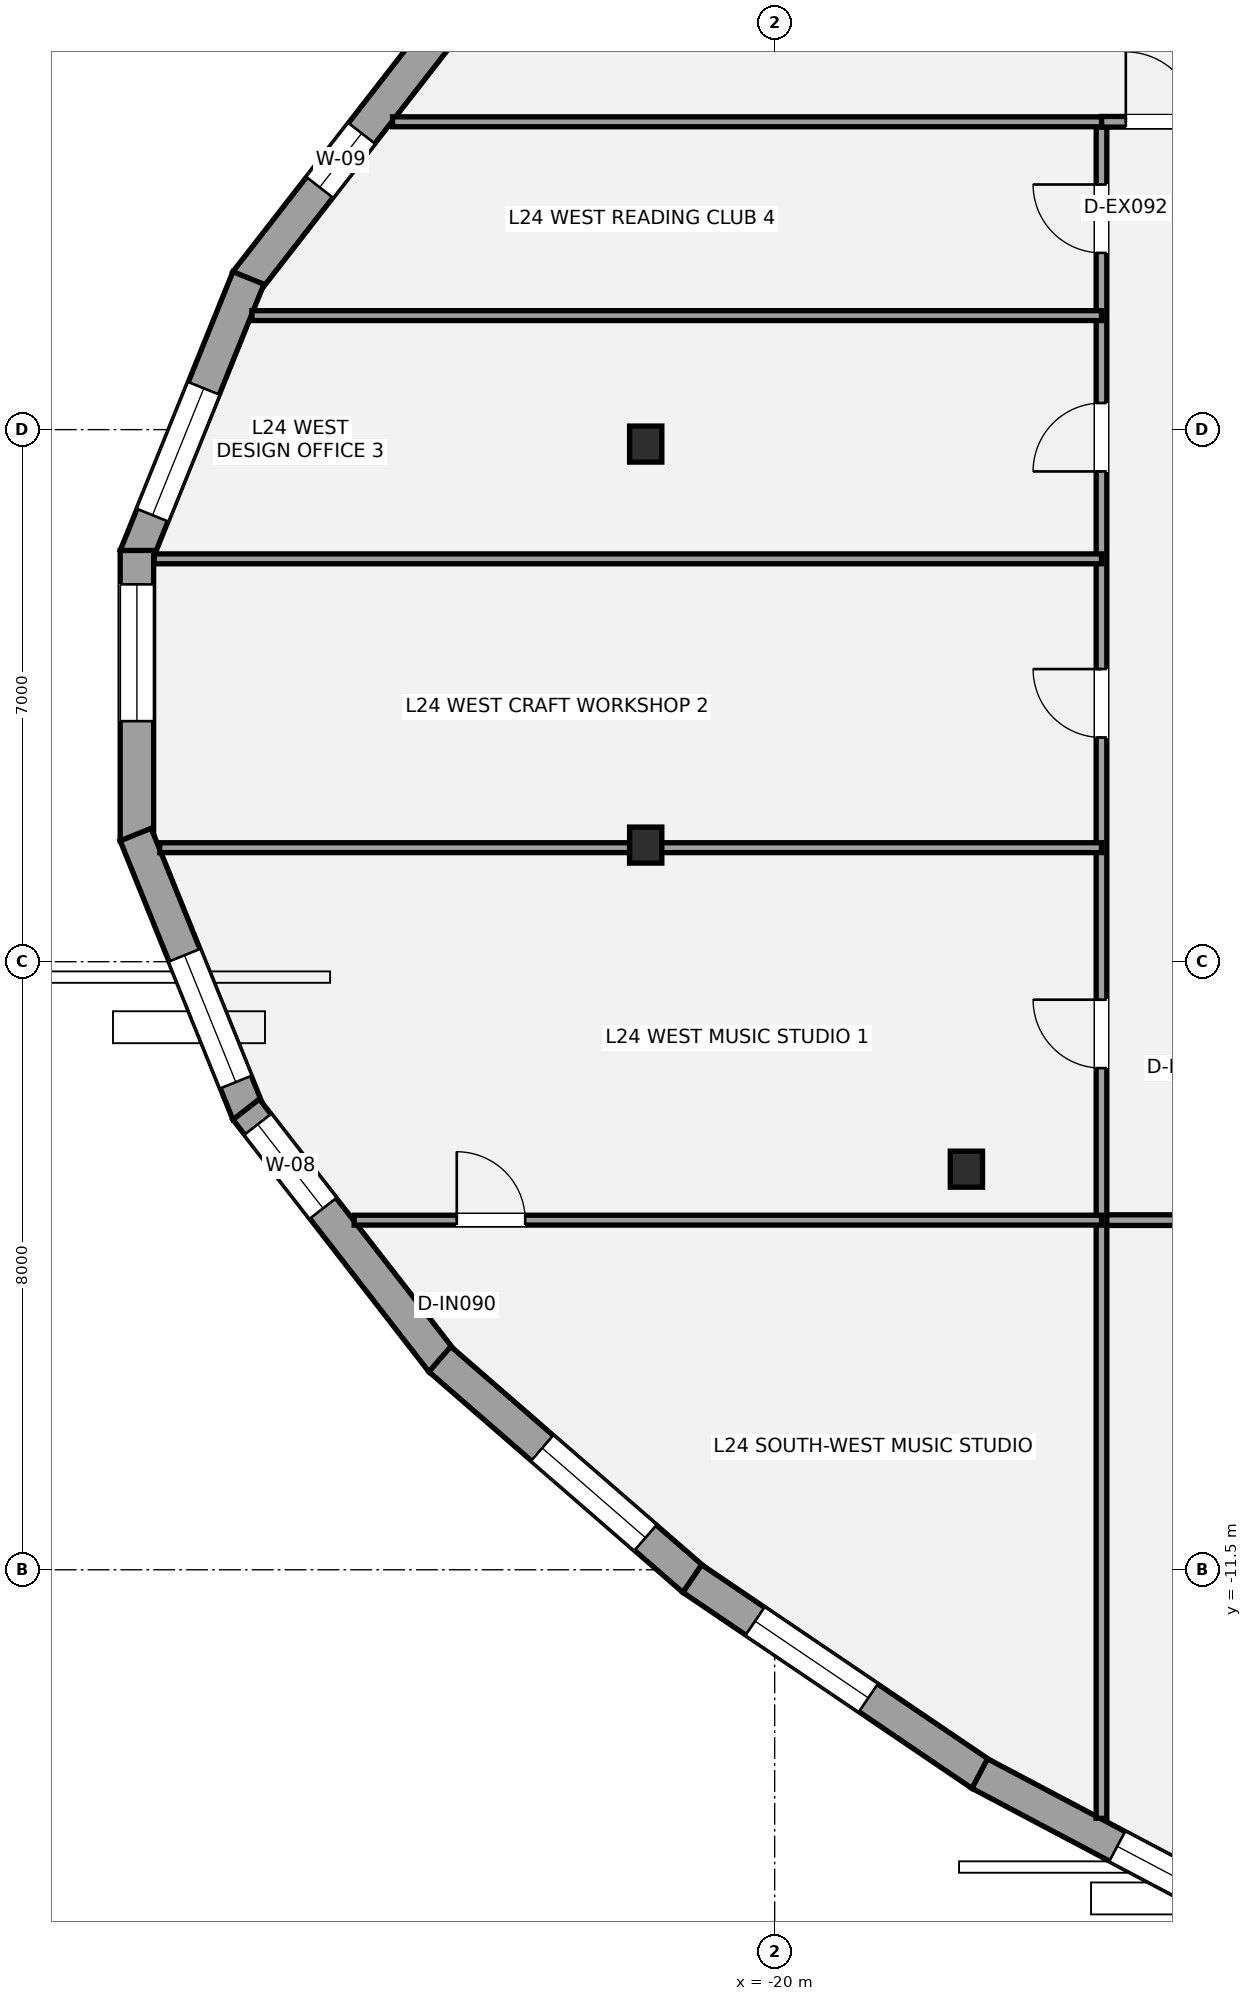
"""IFC4 building model, lengths in metres.
Left out: names, types, materials, properties, quantities, classifications, styles, units other than length and angle.
Written with IfcOpenShell. Run it as: python <this file> out.ifc"""

import sys

from ifc_helpers import new_model, si_unit, direction, frame, frame_2d, origin, origin_2d, place, context, subcontext, project, spatial, rectangle, i_section, extrude, element, fill, save


model = new_model("IFC4")
c1 = context("Model", 3, precision=1e-05, world=origin(), true_north=direction((0.0, 1.0)))
c2 = subcontext(c1, "Body", "Model", "MODEL_VIEW")
j1 = project(units=[si_unit("LENGTHUNIT", "METRE"), si_unit("PLANEANGLEUNIT", "RADIAN")], contexts=[c1])
p1 = place(None, origin())
s1 = spatial("IfcSite", under=j1, at=p1, CompositionType="ELEMENT")
p2 = place(p1, origin())
s2 = spatial("IfcBuilding", under=s1, at=p2, CompositionType="ELEMENT")
p3 = place(p2, frame((0.0, 0.0, 93.1)))
s3 = spatial("IfcBuildingStorey", under=s2, at=p3, CompositionType="ELEMENT", Elevation=93.1)
for number, where, z_axis, x_axis in (
    (1, (-21.697, 3.31, 0.0), (0.0, 0.0, 1.0), (1.0, 0.0, 0.0)),
    (2, (-21.697, -1.966, 0.0), (0.0, 0.0, 1.0), (1.0, 0.0, 0.0)),
    (3, (-17.477, -6.229, 0.0), (0.0, 0.0, 1.0), (1.0, 0.0, 0.0)),
):
    element("IfcColumn", number, at=place(p3, frame(where, z_axis=z_axis, x_axis=x_axis)), inside=s3, PredefinedType="COLUMN", context=c2, shape_type="SweptSolid", body=[
        extrude(i_section(OverallWidth=0.424, OverallDepth=0.474, WebThickness=0.048, FlangeThickness=0.077, at=origin_2d()), origin(), (0.0, 0.0, 1.0), 3.5),
    ])
p4 = place(p3, frame((-26.954, 5.443, 0.0), z_axis=(0.0, 0.0, 1.0), x_axis=(0.61375552181, 0.789496142769, 0.0)))
e4 = element("IfcWall", 4, at=p4, inside=s3, PredefinedType="STANDARD", context=c2, shape_type="SweptSolid", body=[
    extrude(rectangle(XDim=4.201, YDim=0.44, at=frame_2d((2.101, 0.0))), origin(), (0.0, 0.0, 1.0), 2.528),
])
p5 = place(p4, frame((1.577, 0.0, 0.58)))
e5 = element("IfcOpeningElement", 5, at=p5, cuts=e4, PredefinedType="OPENING", context=c2, shape_type="SweptSolid", body=[
    extrude(rectangle(XDim=0.9, YDim=1.35, at=frame_2d((0.45, 0.675))), frame((0.0, 0.23, 0.0), z_axis=(0.0, -1.0, 0.0), x_axis=(1.0, 0.0, 0.0)), (0.0, 0.0, 1.0), 0.46),
])
p6 = place(p3, frame((-28.407, 1.828, 0.0), z_axis=(0.0, 0.0, 1.0), x_axis=(0.374920072969, 0.927057138954, 0.0)))
e6 = element("IfcWall", 6, at=p6, inside=s3, PredefinedType="STANDARD", context=c2, shape_type="SweptSolid", body=[
    extrude(rectangle(XDim=3.957, YDim=0.44, at=frame_2d((1.978, 0.0))), origin(), (0.0, 0.0, 1.0), 2.528),
])
p7 = place(p6, frame((0.59, 0.0, 0.65)))
e7 = element("IfcOpeningElement", 7, at=p7, cuts=e6, PredefinedType="OPENING", context=c2, shape_type="SweptSolid", body=[
    extrude(rectangle(XDim=1.8, YDim=1.7, at=frame_2d((0.9, 0.85))), frame((0.0, 0.23, 0.0), z_axis=(0.0, -1.0, 0.0), x_axis=(1.0, 0.0, 0.0)), (0.0, 0.0, 1.0), 0.46),
])
p8 = place(p3, frame((-28.391, -1.91, 0.0), z_axis=(0.0, 0.0, 1.0), x_axis=(0.0, 1.0, 0.0)))
e8 = element("IfcWall", 8, at=p8, inside=s3, PredefinedType="STANDARD", context=c2, shape_type="SweptSolid", body=[
    extrude(rectangle(XDim=3.82, YDim=0.44, at=frame_2d((1.91, 0.0))), origin(), (0.0, 0.0, 1.0), 2.528),
])
p9 = place(p8, frame((1.575, 0.0, 0.65)))
e9 = element("IfcOpeningElement", 9, at=p9, cuts=e8, PredefinedType="OPENING", context=c2, shape_type="SweptSolid", body=[
    extrude(rectangle(XDim=1.8, YDim=1.7, at=frame_2d((0.9, 0.85))), frame((0.0, 0.23, 0.0), z_axis=(0.0, -1.0, 0.0), x_axis=(1.0, 0.0, 0.0)), (0.0, 0.0, 1.0), 0.46),
])
p10 = place(p3, frame((-26.924, -5.496, 0.0), z_axis=(0.0, 0.0, 1.0), x_axis=(-0.374920072969, 0.927057138954, 0.0)))
e10 = element("IfcWall", 10, at=p10, inside=s3, PredefinedType="STANDARD", context=c2, shape_type="SweptSolid", body=[
    extrude(rectangle(XDim=3.957, YDim=0.44, at=frame_2d((1.978, 0.0))), origin(), (0.0, 0.0, 1.0), 2.528),
])
p11 = place(p10, frame((0.444, 0.0, 0.65)))
e11 = element("IfcOpeningElement", 11, at=p11, cuts=e10, PredefinedType="OPENING", context=c2, shape_type="SweptSolid", body=[
    extrude(rectangle(XDim=1.8, YDim=1.7, at=frame_2d((0.9, 0.85))), frame((0.0, 0.23, 0.0), z_axis=(0.0, -1.0, 0.0), x_axis=(1.0, 0.0, 0.0)), (0.0, 0.0, 1.0), 0.46),
])
p12 = place(p3, frame((-24.376, -8.76, 0.0), z_axis=(0.0, 0.0, 1.0), x_axis=(-0.61375552181, 0.789496142769, 0.0)))
e12 = element("IfcWall", 12, at=p12, inside=s3, PredefinedType="STANDARD", context=c2, shape_type="SweptSolid", body=[
    extrude(rectangle(XDim=4.201, YDim=0.44, at=frame_2d((2.101, 0.0))), origin(), (0.0, 0.0, 1.0), 2.528),
])
p13 = place(p12, frame((2.552, 0.0, 0.58)))
e13 = element("IfcOpeningElement", 13, at=p13, cuts=e12, PredefinedType="OPENING", context=c2, shape_type="SweptSolid", body=[
    extrude(rectangle(XDim=1.4, YDim=1.55, at=frame_2d((0.7, 0.775))), frame((0.0, 0.23, 0.0), z_axis=(0.0, -1.0, 0.0), x_axis=(1.0, 0.0, 0.0)), (0.0, 0.0, 1.0), 0.46),
])
p14 = place(p3, frame((-21.063, -11.632, 0.0), z_axis=(0.0, 0.0, 1.0), x_axis=(-0.754922454992, 0.655814064312, 0.0)))
e14 = element("IfcWall", 14, at=p14, inside=s3, PredefinedType="STANDARD", context=c2, shape_type="SweptSolid", body=[
    extrude(rectangle(XDim=4.427, YDim=0.44, at=frame_2d((2.213, 0.0))), origin(), (0.0, 0.0, 1.0), 2.528),
])
p15 = place(p14, frame((0.843, 0.0, 0.65)))
e15 = element("IfcOpeningElement", 15, at=p15, cuts=e14, PredefinedType="OPENING", context=c2, shape_type="SweptSolid", body=[
    extrude(rectangle(XDim=1.8, YDim=1.7, at=frame_2d((0.9, 0.85))), frame((0.0, 0.23, 0.0), z_axis=(0.0, -1.0, 0.0), x_axis=(1.0, 0.0, 0.0)), (0.0, 0.0, 1.0), 0.46),
])
p16 = place(p3, frame((-17.281, -14.193, 0.0), z_axis=(0.0, 0.0, 1.0), x_axis=(-0.827749911298, 0.561097214701, 0.0)))
e16 = element("IfcWall", 16, at=p16, inside=s3, PredefinedType="STANDARD", context=c2, shape_type="SweptSolid", body=[
    extrude(rectangle(XDim=4.594, YDim=0.44, at=frame_2d((2.297, 0.0))), origin(), (0.0, 0.0, 1.0), 2.528),
])
p17 = place(p16, frame((1.796, 0.0, 0.65)))
e17 = element("IfcOpeningElement", 17, at=p17, cuts=e16, PredefinedType="OPENING", context=c2, shape_type="SweptSolid", body=[
    extrude(rectangle(XDim=1.8, YDim=1.7, at=frame_2d((0.9, 0.85))), frame((0.0, 0.23, 0.0), z_axis=(0.0, -1.0, 0.0), x_axis=(1.0, 0.0, 0.0)), (0.0, 0.0, 1.0), 0.46),
])
p18 = place(p3, frame((-13.019, -16.446, 0.0), z_axis=(0.0, 0.0, 1.0), x_axis=(-0.88395333318, 0.467575132743, 0.0)))
e18 = element("IfcWall", 18, at=p18, inside=s3, PredefinedType="STANDARD", context=c2, shape_type="SweptSolid", body=[
    extrude(rectangle(XDim=4.845, YDim=0.44, at=frame_2d((2.422, 0.0))), origin(), (0.0, 0.0, 1.0), 2.528),
])
p19 = place(p18, frame((0.998, 0.0, 0.65)))
e19 = element("IfcOpeningElement", 19, at=p19, cuts=e18, PredefinedType="OPENING", context=c2, shape_type="SweptSolid", body=[
    extrude(rectangle(XDim=1.8, YDim=1.7, at=frame_2d((0.9, 0.85))), frame((0.0, 0.23, 0.0), z_axis=(0.0, -1.0, 0.0), x_axis=(1.0, 0.0, 0.0)), (0.0, 0.0, 1.0), 0.46),
])
p20 = place(p3, frame((-15.7, -6.9, 0.0), z_axis=(0.0, 0.0, 1.0), x_axis=(1.0, 0.0, 0.0)))
e20 = element("IfcWall", 20, at=p20, inside=s3, PredefinedType="PARTITIONING", context=c2, shape_type="SweptSolid", body=[
    extrude(rectangle(XDim=33.2, YDim=0.14, at=frame_2d((16.6, 0.0))), origin(), (0.0, 0.0, 1.0), 2.688),
])
p21 = place(p20, frame((3.15, 0.0, 0.0)))
e21 = element("IfcOpeningElement", 21, at=p21, cuts=e20, PredefinedType="OPENING", context=c2, shape_type="SweptSolid", body=[
    extrude(rectangle(XDim=0.9, YDim=2.1, at=frame_2d((0.45, 1.05))), frame((0.0, 0.08, 0.0), z_axis=(0.0, -1.0, 0.0), x_axis=(1.0, 0.0, 0.0)), (0.0, 0.0, 1.0), 0.16),
])
p22 = place(p20, frame((11.0, 0.0, 0.0)))
e22 = element("IfcOpeningElement", 22, at=p22, cuts=e20, PredefinedType="OPENING", context=c2, shape_type="SweptSolid", body=[
    extrude(rectangle(XDim=0.9, YDim=2.1, at=frame_2d((0.45, 1.05))), frame((0.0, 0.08, 0.0), z_axis=(0.0, -1.0, 0.0), x_axis=(1.0, 0.0, 0.0)), (0.0, 0.0, 1.0), 0.16),
])
p23 = place(p20, frame((19.5, 0.0, 0.0)))
e23 = element("IfcOpeningElement", 23, at=p23, cuts=e20, PredefinedType="OPENING", context=c2, shape_type="SweptSolid", body=[
    extrude(rectangle(XDim=0.9, YDim=2.1, at=frame_2d((0.45, 1.05))), frame((0.0, 0.08, 0.0), z_axis=(0.0, -1.0, 0.0), x_axis=(1.0, 0.0, 0.0)), (0.0, 0.0, 1.0), 0.16),
])
p24 = place(p20, frame((27.95, 0.0, 0.0)))
e24 = element("IfcOpeningElement", 24, at=p24, cuts=e20, PredefinedType="OPENING", context=c2, shape_type="SweptSolid", body=[
    extrude(rectangle(XDim=1.5, YDim=2.15, at=frame_2d((0.75, 1.075))), frame((0.0, 0.08, 0.0), z_axis=(0.0, -1.0, 0.0), x_axis=(1.0, 0.0, 0.0)), (0.0, 0.0, 1.0), 0.16),
])
p25 = place(p3, frame((-15.7, -14.77, 0.0), z_axis=(0.0, 0.0, 1.0), x_axis=(0.0, 1.0, 0.0)))
e25 = element("IfcWall", 25, at=p25, inside=s3, PredefinedType="PARTITIONING", context=c2, shape_type="SweptSolid", body=[
    extrude(rectangle(XDim=22.32, YDim=0.14, at=frame_2d((11.16, 0.0))), origin(), (0.0, 0.0, 1.0), 2.751),
])
p26 = place(p25, frame((9.87, 0.0, 0.0)))
e26 = element("IfcOpeningElement", 26, at=p26, cuts=e25, PredefinedType="OPENING", context=c2, shape_type="SweptSolid", body=[
    extrude(rectangle(XDim=0.9, YDim=2.1, at=frame_2d((0.45, 1.05))), frame((0.0, 0.08, 0.0), z_axis=(0.0, -1.0, 0.0), x_axis=(1.0, 0.0, 0.0)), (0.0, 0.0, 1.0), 0.16),
])
p27 = place(p25, frame((14.22, 0.0, 0.0)))
e27 = element("IfcOpeningElement", 27, at=p27, cuts=e25, PredefinedType="OPENING", context=c2, shape_type="SweptSolid", body=[
    extrude(rectangle(XDim=0.9, YDim=2.1, at=frame_2d((0.45, 1.05))), frame((0.0, 0.08, 0.0), z_axis=(0.0, -1.0, 0.0), x_axis=(1.0, 0.0, 0.0)), (0.0, 0.0, 1.0), 0.16),
])
p28 = place(p25, frame((17.72, 0.0, 0.0)))
e28 = element("IfcOpeningElement", 28, at=p28, cuts=e25, PredefinedType="OPENING", context=c2, shape_type="SweptSolid", body=[
    extrude(rectangle(XDim=0.9, YDim=2.1, at=frame_2d((0.45, 1.05))), frame((0.0, 0.08, 0.0), z_axis=(0.0, -1.0, 0.0), x_axis=(1.0, 0.0, 0.0)), (0.0, 0.0, 1.0), 0.16),
])
p29 = place(p25, frame((20.595, 0.0, 0.0)))
e29 = element("IfcOpeningElement", 29, at=p29, cuts=e25, PredefinedType="OPENING", context=c2, shape_type="SweptSolid", body=[
    extrude(rectangle(XDim=0.9, YDim=2.1, at=frame_2d((0.45, 1.05))), frame((0.0, 0.08, 0.0), z_axis=(0.0, -1.0, 0.0), x_axis=(1.0, 0.0, 0.0)), (0.0, 0.0, 1.0), 0.16),
])
p30 = place(p3, frame((-15.7, 7.55, 0.0), z_axis=(0.0, 0.0, 1.0), x_axis=(1.0, 0.0, 0.0)))
e30 = element("IfcWall", 30, at=p30, inside=s3, PredefinedType="PARTITIONING", context=c2, shape_type="SweptSolid", body=[
    extrude(rectangle(XDim=1.8, YDim=0.14, at=frame_2d((0.9, 0.0))), origin(), (0.0, 0.0, 1.0), 2.763),
])
p31 = place(p30, frame((0.32, 0.0, 0.0)))
e31 = element("IfcOpeningElement", 31, at=p31, cuts=e30, PredefinedType="OPENING", context=c2, shape_type="SweptSolid", body=[
    extrude(rectangle(XDim=0.92, YDim=2.15, at=frame_2d((0.46, 1.075))), frame((0.0, 0.08, 0.0), z_axis=(0.0, -1.0, 0.0), x_axis=(1.0, 0.0, 0.0)), (0.0, 0.0, 1.0), 0.16),
])
p32 = place(p3, frame((-25.027, 7.55, 0.0), z_axis=(0.0, 0.0, 1.0), x_axis=(1.0, 0.0, 0.0)))
e32 = element("IfcWall", 32, at=p32, inside=s3, PredefinedType="PARTITIONING", context=c2, shape_type="SweptSolid", body=[
    extrude(rectangle(XDim=9.327, YDim=0.13, at=frame_2d((4.664, 0.0))), origin(), (0.0, 0.0, 1.0), 3.31),
])
p33 = place(p3, frame((-25.533, -6.9, 0.0), z_axis=(0.0, 0.0, 1.0), x_axis=(1.0, 0.0, 0.0)))
e33 = element("IfcWall", 33, at=p33, inside=s3, PredefinedType="PARTITIONING", context=c2, shape_type="SweptSolid", body=[
    extrude(rectangle(XDim=9.833, YDim=0.13, at=frame_2d((4.917, 0.0))), origin(), (0.0, 0.0, 1.0), 2.688),
])
p34 = place(p33, frame((1.35, 0.0, 0.0)))
e34 = element("IfcOpeningElement", 34, at=p34, cuts=e33, PredefinedType="OPENING", context=c2, shape_type="SweptSolid", body=[
    extrude(rectangle(XDim=0.9, YDim=2.1, at=frame_2d((0.45, 1.05))), frame((0.0, 0.075, 0.0), z_axis=(0.0, -1.0, 0.0), x_axis=(1.0, 0.0, 0.0)), (0.0, 0.0, 1.0), 0.15),
])
p35 = place(p3, frame((-28.091, -2.0, 0.0), z_axis=(0.0, 0.0, 1.0), x_axis=(1.0, 0.0, 0.0)))
e35 = element("IfcWall", 35, at=p35, inside=s3, PredefinedType="PARTITIONING", context=c2, shape_type="SweptSolid", body=[
    extrude(rectangle(XDim=12.391, YDim=0.13, at=frame_2d((6.196, 0.0))), origin(), (0.0, 0.0, 1.0), 2.688),
])
p36 = place(p3, frame((-28.163, 1.8, 0.0), z_axis=(0.0, 0.0, 1.0), x_axis=(1.0, 0.0, 0.0)))
e36 = element("IfcWall", 36, at=p36, inside=s3, PredefinedType="PARTITIONING", context=c2, shape_type="SweptSolid", body=[
    extrude(rectangle(XDim=12.463, YDim=0.13, at=frame_2d((6.231, 0.0))), origin(), (0.0, 0.0, 1.0), 2.751),
])
p37 = place(p3, frame((-26.878, 5.0, 0.0), z_axis=(0.0, 0.0, 1.0), x_axis=(1.0, 0.0, 0.0)))
e37 = element("IfcWall", 37, at=p37, inside=s3, PredefinedType="PARTITIONING", context=c2, shape_type="SweptSolid", body=[
    extrude(rectangle(XDim=11.178, YDim=0.13, at=frame_2d((5.589, 0.0))), origin(), (0.0, 0.0, 1.0), 2.763),
])
p38 = place(p5, origin())
e38 = element("IfcWindow", 38, at=p38, inside=s3, PartitioningType="SINGLE_PANEL", PredefinedType="WINDOW", context=c2, shape_type="SweptSolid", body=[
    extrude(rectangle(XDim=0.9, YDim=1.35, at=frame_2d((0.45, 0.675))), frame((0.0, -0.01, 0.0), z_axis=(0.0, -1.0, 0.0), x_axis=(1.0, 0.0, 0.0)), (0.0, 0.0, 1.0), 0.06),
])
fill(e5, e38)
p39 = place(p7, origin())
e39 = element("IfcWindow", 39, at=p39, inside=s3, PartitioningType="SINGLE_PANEL", PredefinedType="WINDOW", context=c2, shape_type="SweptSolid", body=[
    extrude(rectangle(XDim=1.8, YDim=1.7, at=frame_2d((0.9, 0.85))), frame((0.0, -0.01, 0.0), z_axis=(0.0, -1.0, 0.0), x_axis=(1.0, 0.0, 0.0)), (0.0, 0.0, 1.0), 0.06),
])
fill(e7, e39)
p40 = place(p9, origin())
e40 = element("IfcWindow", 40, at=p40, inside=s3, PartitioningType="SINGLE_PANEL", PredefinedType="WINDOW", context=c2, shape_type="SweptSolid", body=[
    extrude(rectangle(XDim=1.8, YDim=1.7, at=frame_2d((0.9, 0.85))), frame((0.0, -0.01, 0.0), z_axis=(0.0, -1.0, 0.0), x_axis=(1.0, 0.0, 0.0)), (0.0, 0.0, 1.0), 0.06),
])
fill(e9, e40)
p41 = place(p11, origin())
e41 = element("IfcWindow", 41, at=p41, inside=s3, PartitioningType="SINGLE_PANEL", PredefinedType="WINDOW", context=c2, shape_type="SweptSolid", body=[
    extrude(rectangle(XDim=1.8, YDim=1.7, at=frame_2d((0.9, 0.85))), frame((0.0, -0.01, 0.0), z_axis=(0.0, -1.0, 0.0), x_axis=(1.0, 0.0, 0.0)), (0.0, 0.0, 1.0), 0.06),
])
fill(e11, e41)
p42 = place(p13, origin())
e42 = element("IfcWindow", 42, at=p42, inside=s3, PartitioningType="SINGLE_PANEL", PredefinedType="WINDOW", context=c2, shape_type="SweptSolid", body=[
    extrude(rectangle(XDim=1.4, YDim=1.55, at=frame_2d((0.7, 0.775))), frame((0.0, -0.01, 0.0), z_axis=(0.0, -1.0, 0.0), x_axis=(1.0, 0.0, 0.0)), (0.0, 0.0, 1.0), 0.06),
])
fill(e13, e42)
p43 = place(p15, origin())
e43 = element("IfcWindow", 43, at=p43, inside=s3, PartitioningType="SINGLE_PANEL", PredefinedType="WINDOW", context=c2, shape_type="SweptSolid", body=[
    extrude(rectangle(XDim=1.8, YDim=1.7, at=frame_2d((0.9, 0.85))), frame((0.0, -0.01, 0.0), z_axis=(0.0, -1.0, 0.0), x_axis=(1.0, 0.0, 0.0)), (0.0, 0.0, 1.0), 0.06),
])
fill(e15, e43)
p44 = place(p17, origin())
e44 = element("IfcWindow", 44, at=p44, inside=s3, PartitioningType="SINGLE_PANEL", PredefinedType="WINDOW", context=c2, shape_type="SweptSolid", body=[
    extrude(rectangle(XDim=1.8, YDim=1.7, at=frame_2d((0.9, 0.85))), frame((0.0, -0.01, 0.0), z_axis=(0.0, -1.0, 0.0), x_axis=(1.0, 0.0, 0.0)), (0.0, 0.0, 1.0), 0.06),
])
fill(e17, e44)
p45 = place(p19, origin())
e45 = element("IfcWindow", 45, at=p45, inside=s3, PartitioningType="SINGLE_PANEL", PredefinedType="WINDOW", context=c2, shape_type="SweptSolid", body=[
    extrude(rectangle(XDim=1.8, YDim=1.7, at=frame_2d((0.9, 0.85))), frame((0.0, -0.01, 0.0), z_axis=(0.0, -1.0, 0.0), x_axis=(1.0, 0.0, 0.0)), (0.0, 0.0, 1.0), 0.06),
])
fill(e19, e45)
p46 = place(p31, origin())
e46 = element("IfcDoor", 46, at=p46, inside=s3, OperationType="SINGLE_SWING_LEFT", PredefinedType="DOOR", context=c2, shape_type="SweptSolid", body=[
    extrude(rectangle(XDim=0.92, YDim=2.15, at=frame_2d((0.46, 1.075))), frame((0.0, 0.025, 0.0), z_axis=(0.0, -1.0, 0.0), x_axis=(1.0, 0.0, 0.0)), (0.0, 0.0, 1.0), 0.05),
])
fill(e31, e46)
p47 = place(p34, origin())
e47 = element("IfcDoor", 47, at=p47, inside=s3, OperationType="SINGLE_SWING_LEFT", PredefinedType="DOOR", context=c2, shape_type="SweptSolid", body=[
    extrude(rectangle(XDim=0.9, YDim=2.1, at=frame_2d((0.45, 1.05))), frame((0.0, 0.025, 0.0), z_axis=(0.0, -1.0, 0.0), x_axis=(1.0, 0.0, 0.0)), (0.0, 0.0, 1.0), 0.05),
])
fill(e34, e47)
p48 = place(p26, origin())
e48 = element("IfcDoor", 48, at=p48, inside=s3, OperationType="SINGLE_SWING_RIGHT", PredefinedType="DOOR", context=c2, shape_type="SweptSolid", body=[
    extrude(rectangle(XDim=0.9, YDim=2.1, at=frame_2d((0.45, 1.05))), frame((0.0, 0.025, 0.0), z_axis=(0.0, -1.0, 0.0), x_axis=(1.0, 0.0, 0.0)), (0.0, 0.0, 1.0), 0.05),
])
fill(e26, e48)
p49 = place(p27, origin())
e49 = element("IfcDoor", 49, at=p49, inside=s3, OperationType="SINGLE_SWING_RIGHT", PredefinedType="DOOR", context=c2, shape_type="SweptSolid", body=[
    extrude(rectangle(XDim=0.9, YDim=2.1, at=frame_2d((0.45, 1.05))), frame((0.0, 0.025, 0.0), z_axis=(0.0, -1.0, 0.0), x_axis=(1.0, 0.0, 0.0)), (0.0, 0.0, 1.0), 0.05),
])
fill(e27, e49)
p50 = place(p28, origin())
e50 = element("IfcDoor", 50, at=p50, inside=s3, OperationType="SINGLE_SWING_LEFT", PredefinedType="DOOR", context=c2, shape_type="SweptSolid", body=[
    extrude(rectangle(XDim=0.9, YDim=2.1, at=frame_2d((0.45, 1.05))), frame((0.0, 0.025, 0.0), z_axis=(0.0, -1.0, 0.0), x_axis=(1.0, 0.0, 0.0)), (0.0, 0.0, 1.0), 0.05),
])
fill(e28, e50)
p51 = place(p29, origin())
e51 = element("IfcDoor", 51, at=p51, inside=s3, OperationType="SINGLE_SWING_RIGHT", PredefinedType="DOOR", context=c2, shape_type="SweptSolid", body=[
    extrude(rectangle(XDim=0.9, YDim=2.1, at=frame_2d((0.45, 1.05))), frame((0.0, 0.025, 0.0), z_axis=(0.0, -1.0, 0.0), x_axis=(1.0, 0.0, 0.0)), (0.0, 0.0, 1.0), 0.05),
])
fill(e29, e51)
save(model, sys.argv[1])
